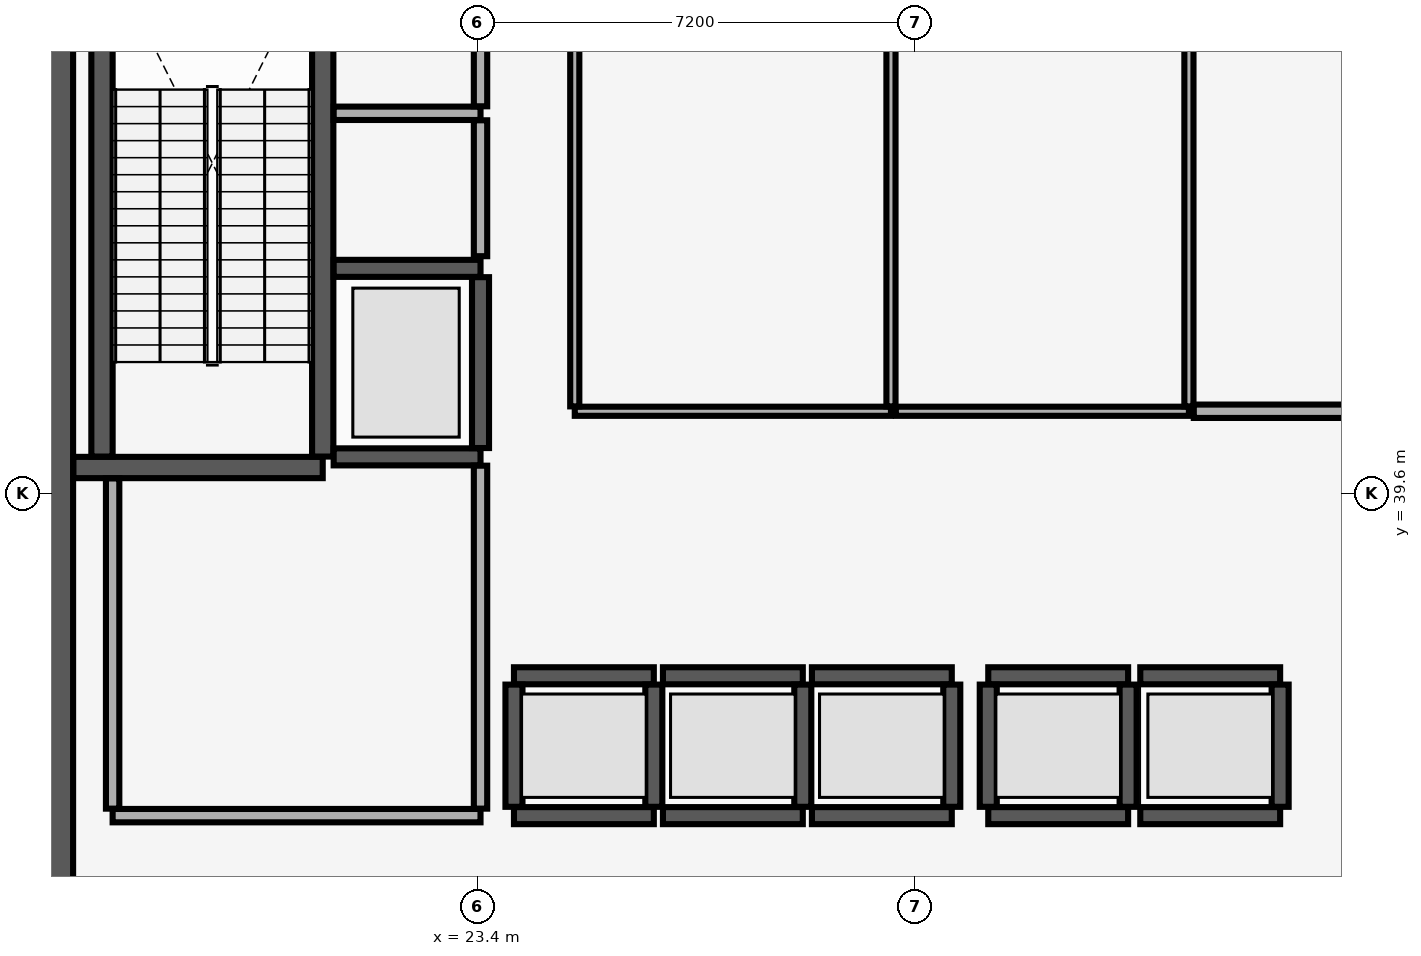
"""IFC4 building model, lengths in metres.
Left out: names, types, materials, properties, quantities, classifications, styles, units other than length and angle.
Written with IfcOpenShell. Run it as: python <this file> out.ifc"""

import sys

from ifc_helpers import new_model, si_unit, direction, frame, frame_2d, origin, place, context, subcontext, project, spatial, rectangle, extrude, element, fill, save


model = new_model("IFC4")
c1 = context("Model", 3, precision=1e-05, world=origin(), true_north=direction((0.0, 1.0)))
c2 = subcontext(c1, "Body", "Model", "MODEL_VIEW")
j1 = project(units=[si_unit("LENGTHUNIT", "METRE"), si_unit("PLANEANGLEUNIT", "RADIAN")], contexts=[c1])
p1 = place(None, origin())
s1 = spatial("IfcSite", under=j1, at=p1, CompositionType="ELEMENT")
p2 = place(p1, origin())
s2 = spatial("IfcBuilding", under=s1, at=p2, CompositionType="ELEMENT")
p3 = place(p2, frame((0.0, 0.0, 8.0)))
s3 = spatial("IfcBuildingStorey", under=s2, at=p3, CompositionType="ELEMENT", Elevation=8.0)
p4 = place(p3, frame((16.2, 29.4, 0.0), z_axis=(0.0, 0.0, 1.0), x_axis=(0.0, 1.0, 0.0)))
e1 = element("IfcWall", 1, at=p4, inside=s3, PredefinedType="SHEAR", context=c2, shape_type="SweptSolid", body=[
    extrude(rectangle(XDim=19.2, YDim=1.1, at=frame_2d((9.6, 0.0))), origin(), (0.0, 0.0, 1.0), 5.68),
])
p5 = place(p3, frame((16.755, 40.025, 0.0), z_axis=(0.0, 0.0, 1.0), x_axis=(1.0, 0.0, 0.0)))
e2 = element("IfcWall", 2, at=p5, inside=s3, PredefinedType="SHEAR", context=c2, shape_type="SweptSolid", body=[
    extrude(rectangle(XDim=4.1, YDim=0.35, at=frame_2d((2.05, 0.0))), origin(), (0.0, 0.0, 1.0), 5.68),
])
p6 = place(p5, frame((1.71, 0.0, 0.0)))
e3 = element("IfcOpeningElement", 3, at=p6, cuts=e2, PredefinedType="OPENING", context=c2, shape_type="SweptSolid", body=[
    extrude(rectangle(XDim=1.15, YDim=2.15, at=frame_2d((0.575, 1.075))), frame((0.0, 0.185, 0.0), z_axis=(0.0, -1.0, 0.0), x_axis=(1.0, 0.0, 0.0)), (0.0, 0.0, 1.0), 0.37),
])
for number, where, z_axis, x_axis in (
    (4, (17.225, 40.205, 0.0), (0.0, 0.0, 1.0), (0.0, 1.0, 0.0)),
    (5, (20.855, 40.205, 0.0), (0.0, 0.0, 1.0), (0.0, 1.0, 0.0)),
):
    element("IfcWall", number, at=place(p3, frame(where, z_axis=z_axis, x_axis=x_axis)), inside=s3, PredefinedType="SHEAR", context=c2, shape_type="SweptSolid", body=[
        extrude(rectangle(XDim=8.09, YDim=0.35, at=frame_2d((4.045, 0.0))), origin(), (0.0, 0.0, 1.0), 5.68),
    ])
p7 = place(p3, frame((24.0, 34.3, 0.0), z_axis=(0.0, 0.0, 1.0), x_axis=(1.0, 0.0, 0.0)))
e6 = element("IfcWall", 6, at=p7, inside=s3, PredefinedType="SHEAR", context=c2, shape_type="SweptSolid", body=[
    extrude(rectangle(XDim=2.3, YDim=0.28, at=frame_2d((1.15, 0.0))), origin(), (0.0, 0.0, 1.0), 5.68),
])
p8 = place(p7, frame((0.6, 0.0, 0.0)))
e7 = element("IfcOpeningElement", 7, at=p8, cuts=e6, PredefinedType="OPENING", context=c2, shape_type="SweptSolid", body=[
    extrude(rectangle(XDim=1.1, YDim=2.2, at=frame_2d((0.55, 1.1))), frame((0.0, 0.15, 0.0), z_axis=(0.0, -1.0, 0.0), x_axis=(1.0, 0.0, 0.0)), (0.0, 0.0, 1.0), 0.3),
])
p9 = place(p3, frame((24.0, 36.6, 0.0), z_axis=(0.0, 0.0, 1.0), x_axis=(1.0, 0.0, 0.0)))
e8 = element("IfcWall", 8, at=p9, inside=s3, PredefinedType="SHEAR", context=c2, shape_type="SweptSolid", body=[
    extrude(rectangle(XDim=2.3, YDim=0.28, at=frame_2d((1.15, 0.0))), origin(), (0.0, 0.0, 1.0), 5.68),
])
for number, where, z_axis, x_axis in (
    (9, (24.0, 34.445, 0.0), (0.0, 0.0, 1.0), (0.0, 1.0, 0.0)),
    (10, (26.3, 34.445, 0.0), (0.0, 0.0, 1.0), (0.0, 1.0, 0.0)),
):
    element("IfcWall", number, at=place(p3, frame(where, z_axis=z_axis, x_axis=x_axis)), inside=s3, PredefinedType="SHEAR", context=c2, shape_type="SweptSolid", body=[
        extrude(rectangle(XDim=2.01, YDim=0.28, at=frame_2d((1.005, 0.0))), origin(), (0.0, 0.0, 1.0), 5.68),
    ])
p10 = place(p3, frame((26.45, 34.3, 0.0), z_axis=(0.0, 0.0, 1.0), x_axis=(1.0, 0.0, 0.0)))
e11 = element("IfcWall", 11, at=p10, inside=s3, PredefinedType="SHEAR", context=c2, shape_type="SweptSolid", body=[
    extrude(rectangle(XDim=2.3, YDim=0.28, at=frame_2d((1.15, 0.0))), origin(), (0.0, 0.0, 1.0), 5.68),
])
p11 = place(p10, frame((0.6, 0.0, 0.0)))
e12 = element("IfcOpeningElement", 12, at=p11, cuts=e11, PredefinedType="OPENING", context=c2, shape_type="SweptSolid", body=[
    extrude(rectangle(XDim=1.1, YDim=2.2, at=frame_2d((0.55, 1.1))), frame((0.0, 0.15, 0.0), z_axis=(0.0, -1.0, 0.0), x_axis=(1.0, 0.0, 0.0)), (0.0, 0.0, 1.0), 0.3),
])
p12 = place(p3, frame((26.45, 36.6, 0.0), z_axis=(0.0, 0.0, 1.0), x_axis=(1.0, 0.0, 0.0)))
e13 = element("IfcWall", 13, at=p12, inside=s3, PredefinedType="SHEAR", context=c2, shape_type="SweptSolid", body=[
    extrude(rectangle(XDim=2.3, YDim=0.28, at=frame_2d((1.15, 0.0))), origin(), (0.0, 0.0, 1.0), 5.68),
])
p13 = place(p3, frame((28.75, 34.445, 0.0), z_axis=(0.0, 0.0, 1.0), x_axis=(0.0, 1.0, 0.0)))
e14 = element("IfcWall", 14, at=p13, inside=s3, PredefinedType="SHEAR", context=c2, shape_type="SweptSolid", body=[
    extrude(rectangle(XDim=2.01, YDim=0.28, at=frame_2d((1.005, 0.0))), origin(), (0.0, 0.0, 1.0), 5.68),
])
p14 = place(p3, frame((28.9, 34.3, 0.0), z_axis=(0.0, 0.0, 1.0), x_axis=(1.0, 0.0, 0.0)))
e15 = element("IfcWall", 15, at=p14, inside=s3, PredefinedType="SHEAR", context=c2, shape_type="SweptSolid", body=[
    extrude(rectangle(XDim=2.3, YDim=0.28, at=frame_2d((1.15, 0.0))), origin(), (0.0, 0.0, 1.0), 5.68),
])
p15 = place(p14, frame((0.6, 0.0, 0.0)))
e16 = element("IfcOpeningElement", 16, at=p15, cuts=e15, PredefinedType="OPENING", context=c2, shape_type="SweptSolid", body=[
    extrude(rectangle(XDim=1.1, YDim=2.2, at=frame_2d((0.55, 1.1))), frame((0.0, 0.15, 0.0), z_axis=(0.0, -1.0, 0.0), x_axis=(1.0, 0.0, 0.0)), (0.0, 0.0, 1.0), 0.3),
])
p16 = place(p3, frame((28.9, 36.6, 0.0), z_axis=(0.0, 0.0, 1.0), x_axis=(1.0, 0.0, 0.0)))
e17 = element("IfcWall", 17, at=p16, inside=s3, PredefinedType="SHEAR", context=c2, shape_type="SweptSolid", body=[
    extrude(rectangle(XDim=2.3, YDim=0.28, at=frame_2d((1.15, 0.0))), origin(), (0.0, 0.0, 1.0), 5.68),
])
p17 = place(p3, frame((31.2, 34.445, 0.0), z_axis=(0.0, 0.0, 1.0), x_axis=(0.0, 1.0, 0.0)))
e18 = element("IfcWall", 18, at=p17, inside=s3, PredefinedType="SHEAR", context=c2, shape_type="SweptSolid", body=[
    extrude(rectangle(XDim=2.01, YDim=0.28, at=frame_2d((1.005, 0.0))), origin(), (0.0, 0.0, 1.0), 5.68),
])
p18 = place(p3, frame((31.8, 34.3, 0.0), z_axis=(0.0, 0.0, 1.0), x_axis=(1.0, 0.0, 0.0)))
e19 = element("IfcWall", 19, at=p18, inside=s3, PredefinedType="SHEAR", context=c2, shape_type="SweptSolid", body=[
    extrude(rectangle(XDim=2.3, YDim=0.28, at=frame_2d((1.15, 0.0))), origin(), (0.0, 0.0, 1.0), 5.68),
])
p19 = place(p18, frame((0.6, 0.0, 0.0)))
e20 = element("IfcOpeningElement", 20, at=p19, cuts=e19, PredefinedType="OPENING", context=c2, shape_type="SweptSolid", body=[
    extrude(rectangle(XDim=1.1, YDim=2.2, at=frame_2d((0.55, 1.1))), frame((0.0, 0.15, 0.0), z_axis=(0.0, -1.0, 0.0), x_axis=(1.0, 0.0, 0.0)), (0.0, 0.0, 1.0), 0.3),
])
p20 = place(p3, frame((31.8, 36.6, 0.0), z_axis=(0.0, 0.0, 1.0), x_axis=(1.0, 0.0, 0.0)))
e21 = element("IfcWall", 21, at=p20, inside=s3, PredefinedType="SHEAR", context=c2, shape_type="SweptSolid", body=[
    extrude(rectangle(XDim=2.3, YDim=0.28, at=frame_2d((1.15, 0.0))), origin(), (0.0, 0.0, 1.0), 5.68),
])
for number, where, z_axis, x_axis in (
    (22, (31.8, 34.445, 0.0), (0.0, 0.0, 1.0), (0.0, 1.0, 0.0)),
    (23, (34.1, 34.445, 0.0), (0.0, 0.0, 1.0), (0.0, 1.0, 0.0)),
):
    element("IfcWall", number, at=place(p3, frame(where, z_axis=z_axis, x_axis=x_axis)), inside=s3, PredefinedType="SHEAR", context=c2, shape_type="SweptSolid", body=[
        extrude(rectangle(XDim=2.01, YDim=0.28, at=frame_2d((1.005, 0.0))), origin(), (0.0, 0.0, 1.0), 5.68),
    ])
p21 = place(p3, frame((34.3, 34.3, 0.0), z_axis=(0.0, 0.0, 1.0), x_axis=(1.0, 0.0, 0.0)))
e24 = element("IfcWall", 24, at=p21, inside=s3, PredefinedType="SHEAR", context=c2, shape_type="SweptSolid", body=[
    extrude(rectangle(XDim=2.3, YDim=0.28, at=frame_2d((1.15, 0.0))), origin(), (0.0, 0.0, 1.0), 5.68),
])
p22 = place(p21, frame((0.6, 0.0, 0.0)))
e25 = element("IfcOpeningElement", 25, at=p22, cuts=e24, PredefinedType="OPENING", context=c2, shape_type="SweptSolid", body=[
    extrude(rectangle(XDim=1.1, YDim=2.2, at=frame_2d((0.55, 1.1))), frame((0.0, 0.15, 0.0), z_axis=(0.0, -1.0, 0.0), x_axis=(1.0, 0.0, 0.0)), (0.0, 0.0, 1.0), 0.3),
])
p23 = place(p3, frame((34.3, 36.6, 0.0), z_axis=(0.0, 0.0, 1.0), x_axis=(1.0, 0.0, 0.0)))
e26 = element("IfcWall", 26, at=p23, inside=s3, PredefinedType="SHEAR", context=c2, shape_type="SweptSolid", body=[
    extrude(rectangle(XDim=2.3, YDim=0.28, at=frame_2d((1.15, 0.0))), origin(), (0.0, 0.0, 1.0), 5.68),
])
p24 = place(p3, frame((36.6, 34.445, 0.0), z_axis=(0.0, 0.0, 1.0), x_axis=(0.0, 1.0, 0.0)))
e27 = element("IfcWall", 27, at=p24, inside=s3, PredefinedType="SHEAR", context=c2, shape_type="SweptSolid", body=[
    extrude(rectangle(XDim=2.01, YDim=0.28, at=frame_2d((1.005, 0.0))), origin(), (0.0, 0.0, 1.0), 5.68),
])
p25 = place(p3, frame((21.035, 40.2, 0.0), z_axis=(0.0, 0.0, 1.0), x_axis=(1.0, 0.0, 0.0)))
e28 = element("IfcWall", 28, at=p25, inside=s3, PredefinedType="SHEAR", context=c2, shape_type="SweptSolid", body=[
    extrude(rectangle(XDim=2.415, YDim=0.28, at=frame_2d((1.208, 0.0))), origin(), (0.0, 0.0, 1.0), 5.68),
])
p26 = place(p25, frame((0.54, 0.0, 0.0)))
e29 = element("IfcOpeningElement", 29, at=p26, cuts=e28, PredefinedType="OPENING", context=c2, shape_type="SweptSolid", body=[
    extrude(rectangle(XDim=1.3, YDim=2.3, at=frame_2d((0.65, 1.15))), frame((0.0, 0.15, 0.0), z_axis=(0.0, -1.0, 0.0), x_axis=(1.0, 0.0, 0.0)), (0.0, 0.0, 1.0), 0.3),
])
p27 = place(p3, frame((21.035, 43.3, 0.0), z_axis=(0.0, 0.0, 1.0), x_axis=(1.0, 0.0, 0.0)))
e30 = element("IfcWall", 30, at=p27, inside=s3, PredefinedType="SHEAR", context=c2, shape_type="SweptSolid", body=[
    extrude(rectangle(XDim=2.415, YDim=0.28, at=frame_2d((1.208, 0.0))), origin(), (0.0, 0.0, 1.0), 5.68),
])
p28 = place(p3, frame((23.45, 40.345, 0.0), z_axis=(0.0, 0.0, 1.0), x_axis=(0.0, 1.0, 0.0)))
e31 = element("IfcWall", 31, at=p28, inside=s3, PredefinedType="SHEAR", context=c2, shape_type="SweptSolid", body=[
    extrude(rectangle(XDim=2.81, YDim=0.28, at=frame_2d((1.405, 0.0))), origin(), (0.0, 0.0, 1.0), 5.68),
])
p29 = place(p3, frame((17.4, 34.3, 0.0), z_axis=(0.0, 0.0, 1.0), x_axis=(1.0, 0.0, 0.0)))
e32 = element("IfcWall", 32, at=p29, inside=s3, PredefinedType="PARTITIONING", context=c2, shape_type="SweptSolid", body=[
    extrude(rectangle(XDim=6.05, YDim=0.22, at=frame_2d((3.025, 0.0))), origin(), (0.0, 0.0, 1.0), 5.68),
])
p30 = place(p29, frame((2.2, 0.0, 0.0)))
e33 = element("IfcOpeningElement", 33, at=p30, cuts=e32, PredefinedType="OPENING", context=c2, shape_type="SweptSolid", body=[
    extrude(rectangle(XDim=1.2, YDim=2.15, at=frame_2d((0.6, 1.075))), frame((0.0, 0.12, 0.0), z_axis=(0.0, -1.0, 0.0), x_axis=(1.0, 0.0, 0.0)), (0.0, 0.0, 1.0), 0.24),
])
p31 = place(p3, frame((17.4, 34.415, 0.0), z_axis=(0.0, 0.0, 1.0), x_axis=(0.0, 1.0, 0.0)))
e34 = element("IfcWall", 34, at=p31, inside=s3, PredefinedType="PARTITIONING", context=c2, shape_type="SweptSolid", body=[
    extrude(rectangle(XDim=5.43, YDim=0.22, at=frame_2d((2.715, 0.0))), origin(), (0.0, 0.0, 1.0), 5.68),
])
p32 = place(p3, frame((23.45, 34.415, 0.0), z_axis=(0.0, 0.0, 1.0), x_axis=(0.0, 1.0, 0.0)))
e35 = element("IfcWall", 35, at=p32, inside=s3, PredefinedType="PARTITIONING", context=c2, shape_type="SweptSolid", body=[
    extrude(rectangle(XDim=5.64, YDim=0.22, at=frame_2d((2.82, 0.0))), origin(), (0.0, 0.0, 1.0), 5.68),
])
p33 = place(p3, frame((21.035, 45.85, 0.0), z_axis=(0.0, 0.0, 1.0), x_axis=(1.0, 0.0, 0.0)))
e36 = element("IfcWall", 36, at=p33, inside=s3, PredefinedType="PARTITIONING", context=c2, shape_type="SweptSolid", body=[
    extrude(rectangle(XDim=2.415, YDim=0.22, at=frame_2d((1.208, 0.0))), origin(), (0.0, 0.0, 1.0), 5.68),
])
p34 = place(p3, frame((23.45, 43.5, 0.0), z_axis=(0.0, 0.0, 1.0), x_axis=(0.0, 1.0, 0.0)))
e37 = element("IfcWall", 37, at=p34, inside=s3, PredefinedType="PARTITIONING", context=c2, shape_type="SweptSolid", body=[
    extrude(rectangle(XDim=2.235, YDim=0.22, at=frame_2d((1.118, 0.0))), origin(), (0.0, 0.0, 1.0), 5.68),
])
p35 = place(p34, frame((0.725, 0.0, 0.0)))
e38 = element("IfcOpeningElement", 38, at=p35, cuts=e37, PredefinedType="OPENING", context=c2, shape_type="SweptSolid", body=[
    extrude(rectangle(XDim=0.85, YDim=2.1, at=frame_2d((0.425, 1.05))), frame((0.0, 0.12, 0.0), z_axis=(0.0, -1.0, 0.0), x_axis=(1.0, 0.0, 0.0)), (0.0, 0.0, 1.0), 0.24),
])
p36 = place(p3, frame((23.45, 45.965, 0.0), z_axis=(0.0, 0.0, 1.0), x_axis=(0.0, 1.0, 0.0)))
e39 = element("IfcWall", 39, at=p36, inside=s3, PredefinedType="PARTITIONING", context=c2, shape_type="SweptSolid", body=[
    extrude(rectangle(XDim=2.22, YDim=0.22, at=frame_2d((1.11, 0.0))), origin(), (0.0, 0.0, 1.0), 5.68),
])
p37 = place(p36, frame((0.96, 0.0, 0.0)))
e40 = element("IfcOpeningElement", 40, at=p37, cuts=e39, PredefinedType="OPENING", context=c2, shape_type="SweptSolid", body=[
    extrude(rectangle(XDim=0.85, YDim=2.1, at=frame_2d((0.425, 1.05))), frame((0.0, 0.12, 0.0), z_axis=(0.0, -1.0, 0.0), x_axis=(1.0, 0.0, 0.0)), (0.0, 0.0, 1.0), 0.24),
])
p38 = place(p3, frame((25.0, 40.95, 0.0), z_axis=(0.0, 0.0, 1.0), x_axis=(1.0, 0.0, 0.0)))
e41 = element("IfcWall", 41, at=p38, inside=s3, PredefinedType="PARTITIONING", context=c2, shape_type="SweptSolid", body=[
    extrude(rectangle(XDim=5.2, YDim=0.15, at=frame_2d((2.6, 0.0))), origin(), (0.0, 0.0, 1.0), 5.68),
])
p39 = place(p38, frame((2.175, 0.0, 0.0)))
e42 = element("IfcOpeningElement", 42, at=p39, cuts=e41, PredefinedType="OPENING", context=c2, shape_type="SweptSolid", body=[
    extrude(rectangle(XDim=0.85, YDim=2.1, at=frame_2d((0.425, 1.05))), frame((0.0, 0.085, 0.0), z_axis=(0.0, -1.0, 0.0), x_axis=(1.0, 0.0, 0.0)), (0.0, 0.0, 1.0), 0.17),
])
for number, where, z_axis, x_axis in (
    (43, (25.0, 41.03, 0.0), (0.0, 0.0, 1.0), (0.0, 1.0, 0.0)),
    (44, (30.2, 41.03, 0.0), (0.0, 0.0, 1.0), (0.0, 1.0, 0.0)),
):
    element("IfcWall", number, at=place(p3, frame(where, z_axis=z_axis, x_axis=x_axis)), inside=s3, PredefinedType="PARTITIONING", context=c2, shape_type="SweptSolid", body=[
        extrude(rectangle(XDim=7.19, YDim=0.15, at=frame_2d((3.595, 0.0))), origin(), (0.0, 0.0, 1.0), 5.68),
    ])
p40 = place(p3, frame((30.28, 40.95, 0.0), z_axis=(0.0, 0.0, 1.0), x_axis=(1.0, 0.0, 0.0)))
e45 = element("IfcWall", 45, at=p40, inside=s3, PredefinedType="PARTITIONING", context=c2, shape_type="SweptSolid", body=[
    extrude(rectangle(XDim=4.82, YDim=0.15, at=frame_2d((2.41, 0.0))), origin(), (0.0, 0.0, 1.0), 5.68),
])
p41 = place(p40, frame((1.87, 0.0, 0.0)))
e46 = element("IfcOpeningElement", 46, at=p41, cuts=e45, PredefinedType="OPENING", context=c2, shape_type="SweptSolid", body=[
    extrude(rectangle(XDim=1.0, YDim=2.15, at=frame_2d((0.5, 1.075))), frame((0.0, 0.085, 0.0), z_axis=(0.0, -1.0, 0.0), x_axis=(1.0, 0.0, 0.0)), (0.0, 0.0, 1.0), 0.17),
])
p42 = place(p3, frame((35.1, 41.03, 0.0), z_axis=(0.0, 0.0, 1.0), x_axis=(0.0, 1.0, 0.0)))
e47 = element("IfcWall", 47, at=p42, inside=s3, PredefinedType="PARTITIONING", context=c2, shape_type="SweptSolid", body=[
    extrude(rectangle(XDim=7.19, YDim=0.15, at=frame_2d((3.595, 0.0))), origin(), (0.0, 0.0, 1.0), 5.68),
])
p43 = place(p3, frame((35.18, 40.95, 0.0), z_axis=(0.0, 0.0, 1.0), x_axis=(1.0, 0.0, 0.0)))
e48 = element("IfcWall", 48, at=p43, inside=s3, PredefinedType="PARTITIONING", context=c2, shape_type="SweptSolid", body=[
    extrude(rectangle(XDim=4.52, YDim=0.22, at=frame_2d((2.26, 0.0))), origin(), (0.0, 0.0, 1.0), 5.68),
])
p44 = place(p43, frame((0.795, 0.0, 0.0)))
e49 = element("IfcOpeningElement", 49, at=p44, cuts=e48, PredefinedType="OPENING", context=c2, shape_type="SweptSolid", body=[
    extrude(rectangle(XDim=0.85, YDim=2.1, at=frame_2d((0.425, 1.05))), frame((0.0, 0.12, 0.0), z_axis=(0.0, -1.0, 0.0), x_axis=(1.0, 0.0, 0.0)), (0.0, 0.0, 1.0), 0.24),
])
p45 = place(p6, origin())
e50 = element("IfcDoor", 50, at=p45, inside=s3, OperationType="SINGLE_SWING_LEFT", PredefinedType="DOOR", context=c2, shape_type="SweptSolid", body=[
    extrude(rectangle(XDim=1.15, YDim=2.15, at=frame_2d((0.575, 1.075))), frame((0.0, 0.025, 0.0), z_axis=(0.0, -1.0, 0.0), x_axis=(1.0, 0.0, 0.0)), (0.0, 0.0, 1.0), 0.05),
])
fill(e3, e50)
p46 = place(p8, origin())
e51 = element("IfcDoor", 51, at=p46, inside=s3, OperationType="DOUBLE_DOOR_SLIDING", PredefinedType="DOOR", context=c2, shape_type="SweptSolid", body=[
    extrude(rectangle(XDim=1.1, YDim=2.2, at=frame_2d((0.55, 1.1))), frame((0.0, 0.025, 0.0), z_axis=(0.0, -1.0, 0.0), x_axis=(1.0, 0.0, 0.0)), (0.0, 0.0, 1.0), 0.05),
])
fill(e7, e51)
p47 = place(p11, origin())
e52 = element("IfcDoor", 52, at=p47, inside=s3, OperationType="DOUBLE_DOOR_SLIDING", PredefinedType="DOOR", context=c2, shape_type="SweptSolid", body=[
    extrude(rectangle(XDim=1.1, YDim=2.2, at=frame_2d((0.55, 1.1))), frame((0.0, 0.025, 0.0), z_axis=(0.0, -1.0, 0.0), x_axis=(1.0, 0.0, 0.0)), (0.0, 0.0, 1.0), 0.05),
])
fill(e12, e52)
p48 = place(p15, origin())
e53 = element("IfcDoor", 53, at=p48, inside=s3, OperationType="DOUBLE_DOOR_SLIDING", PredefinedType="DOOR", context=c2, shape_type="SweptSolid", body=[
    extrude(rectangle(XDim=1.1, YDim=2.2, at=frame_2d((0.55, 1.1))), frame((0.0, 0.025, 0.0), z_axis=(0.0, -1.0, 0.0), x_axis=(1.0, 0.0, 0.0)), (0.0, 0.0, 1.0), 0.05),
])
fill(e16, e53)
p49 = place(p19, origin())
e54 = element("IfcDoor", 54, at=p49, inside=s3, OperationType="DOUBLE_DOOR_SLIDING", PredefinedType="DOOR", context=c2, shape_type="SweptSolid", body=[
    extrude(rectangle(XDim=1.1, YDim=2.2, at=frame_2d((0.55, 1.1))), frame((0.0, 0.025, 0.0), z_axis=(0.0, -1.0, 0.0), x_axis=(1.0, 0.0, 0.0)), (0.0, 0.0, 1.0), 0.05),
])
fill(e20, e54)
p50 = place(p22, origin())
e55 = element("IfcDoor", 55, at=p50, inside=s3, OperationType="DOUBLE_DOOR_SLIDING", PredefinedType="DOOR", context=c2, shape_type="SweptSolid", body=[
    extrude(rectangle(XDim=1.1, YDim=2.2, at=frame_2d((0.55, 1.1))), frame((0.0, 0.025, 0.0), z_axis=(0.0, -1.0, 0.0), x_axis=(1.0, 0.0, 0.0)), (0.0, 0.0, 1.0), 0.05),
])
fill(e25, e55)
p51 = place(p26, origin())
e56 = element("IfcDoor", 56, at=p51, inside=s3, OperationType="DOUBLE_DOOR_SLIDING", PredefinedType="DOOR", context=c2, shape_type="SweptSolid", body=[
    extrude(rectangle(XDim=1.3, YDim=2.3, at=frame_2d((0.65, 1.15))), frame((0.0, 0.025, 0.0), z_axis=(0.0, -1.0, 0.0), x_axis=(1.0, 0.0, 0.0)), (0.0, 0.0, 1.0), 0.05),
])
fill(e29, e56)
p52 = place(p30, origin())
e57 = element("IfcDoor", 57, at=p52, inside=s3, OperationType="SINGLE_SWING_LEFT", PredefinedType="DOOR", context=c2, shape_type="SweptSolid", body=[
    extrude(rectangle(XDim=1.2, YDim=2.15, at=frame_2d((0.6, 1.075))), frame((0.0, 0.025, 0.0), z_axis=(0.0, -1.0, 0.0), x_axis=(1.0, 0.0, 0.0)), (0.0, 0.0, 1.0), 0.05),
])
fill(e33, e57)
p53 = place(p35, origin())
e58 = element("IfcDoor", 58, at=p53, inside=s3, OperationType="SINGLE_SWING_LEFT", PredefinedType="DOOR", context=c2, shape_type="SweptSolid", body=[
    extrude(rectangle(XDim=0.85, YDim=2.1, at=frame_2d((0.425, 1.05))), frame((0.0, 0.025, 0.0), z_axis=(0.0, -1.0, 0.0), x_axis=(1.0, 0.0, 0.0)), (0.0, 0.0, 1.0), 0.05),
])
fill(e38, e58)
p54 = place(p39, origin())
e59 = element("IfcDoor", 59, at=p54, inside=s3, OperationType="SINGLE_SWING_LEFT", PredefinedType="DOOR", context=c2, shape_type="SweptSolid", body=[
    extrude(rectangle(XDim=0.85, YDim=2.1, at=frame_2d((0.425, 1.05))), frame((0.0, 0.025, 0.0), z_axis=(0.0, -1.0, 0.0), x_axis=(1.0, 0.0, 0.0)), (0.0, 0.0, 1.0), 0.05),
])
fill(e42, e59)
p55 = place(p41, origin())
e60 = element("IfcDoor", 60, at=p55, inside=s3, OperationType="SINGLE_SWING_RIGHT", PredefinedType="DOOR", context=c2, shape_type="SweptSolid", body=[
    extrude(rectangle(XDim=1.0, YDim=2.15, at=frame_2d((0.5, 1.075))), frame((0.0, 0.025, 0.0), z_axis=(0.0, -1.0, 0.0), x_axis=(1.0, 0.0, 0.0)), (0.0, 0.0, 1.0), 0.05),
])
fill(e46, e60)
p56 = place(p44, origin())
e61 = element("IfcDoor", 61, at=p56, inside=s3, OperationType="SINGLE_SWING_LEFT", PredefinedType="DOOR", context=c2, shape_type="SweptSolid", body=[
    extrude(rectangle(XDim=0.85, YDim=2.1, at=frame_2d((0.425, 1.05))), frame((0.0, 0.025, 0.0), z_axis=(0.0, -1.0, 0.0), x_axis=(1.0, 0.0, 0.0)), (0.0, 0.0, 1.0), 0.05),
])
fill(e49, e61)
save(model, sys.argv[1])
